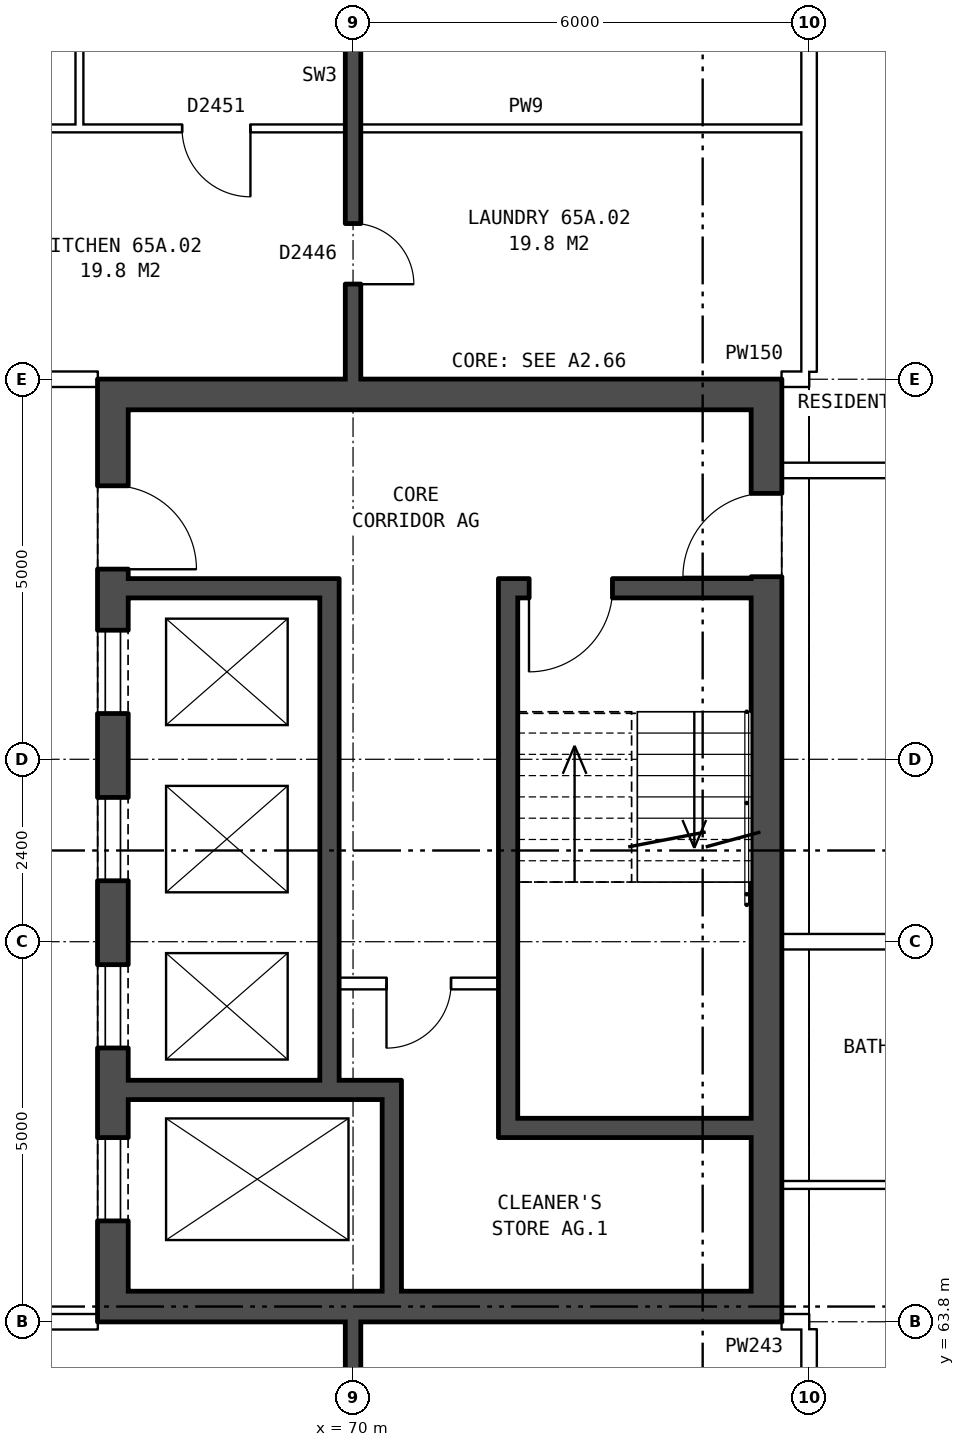
"""IFC4 building model, lengths in metres.
Left out: names, types, materials, properties, quantities, classifications, styles, units other than length and angle.
Written with IfcOpenShell. Run it as: python <this file> out.ifc"""

import sys

from ifc_helpers import new_model, si_unit, direction, frame, frame_2d, origin, place, context, subcontext, project, spatial, rectangle, extrude, element, fill, save


model = new_model("IFC4")
c1 = context("Model", 3, precision=1e-05, world=origin(), true_north=direction((0.0, 1.0)))
c2 = subcontext(c1, "Body", "Model", "MODEL_VIEW")
j1 = project(units=[si_unit("LENGTHUNIT", "METRE"), si_unit("PLANEANGLEUNIT", "RADIAN")], contexts=[c1])
p1 = place(None, origin())
s1 = spatial("IfcSite", under=j1, at=p1, CompositionType="ELEMENT")
p2 = place(p1, origin())
s2 = spatial("IfcBuilding", under=s1, at=p2, CompositionType="ELEMENT")
p3 = place(p2, frame((0.0, 0.0, 230.7)))
s3 = spatial("IfcBuildingStorey", under=s2, at=p3, CompositionType="ELEMENT", Elevation=230.7)
p4 = place(p3, frame((66.84, 63.8, 0.0), z_axis=(0.0, 0.0, 1.0), x_axis=(0.0, 1.0, 0.0)))
e1 = element("IfcWall", 1, at=p4, inside=s3, PredefinedType="SHEAR", context=c2, shape_type="SweptSolid", body=[
    extrude(rectangle(XDim=12.4, YDim=0.4, at=frame_2d((6.2, 0.0))), origin(), (0.0, 0.0, 1.0), 2.85),
])
p5 = place(p4, frame((1.325, 0.0, 0.0)))
e2 = element("IfcOpeningElement", 2, at=p5, cuts=e1, PredefinedType="OPENING", context=c2, shape_type="SweptSolid", body=[
    extrude(rectangle(XDim=1.1, YDim=2.1, at=frame_2d((0.55, 1.05))), frame((0.0, 0.21, 0.0), z_axis=(0.0, -1.0, 0.0), x_axis=(1.0, 0.0, 0.0)), (0.0, 0.0, 1.0), 0.42),
])
p6 = place(p4, frame((3.6, 0.0, 0.0)))
e3 = element("IfcOpeningElement", 3, at=p6, cuts=e1, PredefinedType="OPENING", context=c2, shape_type="SweptSolid", body=[
    extrude(rectangle(XDim=1.1, YDim=2.1, at=frame_2d((0.55, 1.05))), frame((0.0, 0.21, 0.0), z_axis=(0.0, -1.0, 0.0), x_axis=(1.0, 0.0, 0.0)), (0.0, 0.0, 1.0), 0.42),
])
p7 = place(p4, frame((5.8, 0.0, 0.0)))
e4 = element("IfcOpeningElement", 4, at=p7, cuts=e1, PredefinedType="OPENING", context=c2, shape_type="SweptSolid", body=[
    extrude(rectangle(XDim=1.1, YDim=2.1, at=frame_2d((0.55, 1.05))), frame((0.0, 0.21, 0.0), z_axis=(0.0, -1.0, 0.0), x_axis=(1.0, 0.0, 0.0)), (0.0, 0.0, 1.0), 0.42),
])
p8 = place(p4, frame((8.0, 0.0, 0.0)))
e5 = element("IfcOpeningElement", 5, at=p8, cuts=e1, PredefinedType="OPENING", context=c2, shape_type="SweptSolid", body=[
    extrude(rectangle(XDim=1.1, YDim=2.1, at=frame_2d((0.55, 1.05))), frame((0.0, 0.21, 0.0), z_axis=(0.0, -1.0, 0.0), x_axis=(1.0, 0.0, 0.0)), (0.0, 0.0, 1.0), 0.42),
])
p9 = place(p4, frame((9.9, 0.0, 0.0)))
e6 = element("IfcOpeningElement", 6, at=p9, cuts=e1, PredefinedType="OPENING", context=c2, shape_type="SweptSolid", body=[
    extrude(rectangle(XDim=1.1, YDim=2.1, at=frame_2d((0.55, 1.05))), frame((0.0, 0.21, 0.0), z_axis=(0.0, -1.0, 0.0), x_axis=(1.0, 0.0, 0.0)), (0.0, 0.0, 1.0), 0.42),
])
p10 = place(p3, frame((75.44, 63.8, 0.0), z_axis=(0.0, 0.0, 1.0), x_axis=(0.0, 1.0, 0.0)))
e7 = element("IfcWall", 7, at=p10, inside=s3, PredefinedType="SHEAR", context=c2, shape_type="SweptSolid", body=[
    extrude(rectangle(XDim=12.4, YDim=0.4, at=frame_2d((6.2, 0.0))), origin(), (0.0, 0.0, 1.0), 2.85),
])
p11 = place(p10, frame((9.8, 0.0, 0.0)))
e8 = element("IfcOpeningElement", 8, at=p11, cuts=e7, PredefinedType="OPENING", context=c2, shape_type="SweptSolid", body=[
    extrude(rectangle(XDim=1.1, YDim=2.1, at=frame_2d((0.55, 1.05))), frame((0.0, 0.21, 0.0), z_axis=(0.0, -1.0, 0.0), x_axis=(1.0, 0.0, 0.0)), (0.0, 0.0, 1.0), 0.42),
])
for number, where, z_axis, x_axis in (
    (9, (67.04, 64.0, 0.0), (0.0, 0.0, 1.0), (1.0, 0.0, 0.0)),
    (10, (67.04, 76.0, 0.0), (0.0, 0.0, 1.0), (1.0, 0.0, 0.0)),
):
    element("IfcWall", number, at=place(p3, frame(where, z_axis=z_axis, x_axis=x_axis)), inside=s3, PredefinedType="SHEAR", context=c2, shape_type="SweptSolid", body=[
        extrude(rectangle(XDim=8.2, YDim=0.4, at=frame_2d((4.1, 0.0))), origin(), (0.0, 0.0, 1.0), 2.85),
    ])
p12 = place(p3, frame((72.165, 66.35, 0.0), z_axis=(0.0, 0.0, 1.0), x_axis=(1.0, 0.0, 0.0)))
e11 = element("IfcWall", 11, at=p12, inside=s3, PredefinedType="SHEAR", context=c2, shape_type="SweptSolid", body=[
    extrude(rectangle(XDim=3.075, YDim=0.25, at=frame_2d((1.538, 0.0))), origin(), (0.0, 0.0, 1.0), 2.85),
])
p13 = place(p3, frame((67.04, 66.85, 0.0), z_axis=(0.0, 0.0, 1.0), x_axis=(1.0, 0.0, 0.0)))
e12 = element("IfcWall", 12, at=p13, inside=s3, PredefinedType="SHEAR", context=c2, shape_type="SweptSolid", body=[
    extrude(rectangle(XDim=3.595, YDim=0.25, at=frame_2d((1.797, 0.0))), origin(), (0.0, 0.0, 1.0), 2.85),
])
p14 = place(p3, frame((69.815, 68.25, 0.0), z_axis=(0.0, 0.0, 1.0), x_axis=(1.0, 0.0, 0.0)))
e13 = element("IfcWall", 13, at=p14, inside=s3, PredefinedType="PARTITIONING", context=c2, shape_type="SweptSolid", body=[
    extrude(rectangle(XDim=2.1, YDim=0.15, at=frame_2d((1.05, 0.0))), origin(), (0.0, 0.0, 1.0), 2.85),
])
p15 = place(p14, frame((0.625, 0.0, 0.0)))
e14 = element("IfcOpeningElement", 14, at=p15, cuts=e13, PredefinedType="OPENING", context=c2, shape_type="SweptSolid", body=[
    extrude(rectangle(XDim=0.85, YDim=2.1, at=frame_2d((0.425, 1.05))), frame((0.0, 0.085, 0.0), z_axis=(0.0, -1.0, 0.0), x_axis=(1.0, 0.0, 0.0)), (0.0, 0.0, 1.0), 0.17),
])
p16 = place(p3, frame((67.04, 73.45, 0.0), z_axis=(0.0, 0.0, 1.0), x_axis=(1.0, 0.0, 0.0)))
e15 = element("IfcWall", 15, at=p16, inside=s3, PredefinedType="SHEAR", context=c2, shape_type="SweptSolid", body=[
    extrude(rectangle(XDim=2.525, YDim=0.25, at=frame_2d((1.262, 0.0))), origin(), (0.0, 0.0, 1.0), 2.85),
])
p17 = place(p3, frame((72.165, 73.45, 0.0), z_axis=(0.0, 0.0, 1.0), x_axis=(1.0, 0.0, 0.0)))
e16 = element("IfcWall", 16, at=p17, inside=s3, PredefinedType="SHEAR", context=c2, shape_type="SweptSolid", body=[
    extrude(rectangle(XDim=3.075, YDim=0.25, at=frame_2d((1.538, 0.0))), origin(), (0.0, 0.0, 1.0), 2.85),
])
p18 = place(p17, frame((0.15, 0.0, 0.0)))
e17 = element("IfcOpeningElement", 17, at=p18, cuts=e16, PredefinedType="OPENING", context=c2, shape_type="SweptSolid", body=[
    extrude(rectangle(XDim=1.1, YDim=2.1, at=frame_2d((0.55, 1.05))), frame((0.0, 0.135, 0.0), z_axis=(0.0, -1.0, 0.0), x_axis=(1.0, 0.0, 0.0)), (0.0, 0.0, 1.0), 0.27),
])
p19 = place(p3, frame((69.69, 66.975, 0.0), z_axis=(0.0, 0.0, 1.0), x_axis=(0.0, 1.0, 0.0)))
e18 = element("IfcWall", 18, at=p19, inside=s3, PredefinedType="SHEAR", context=c2, shape_type="SweptSolid", body=[
    extrude(rectangle(XDim=6.6, YDim=0.25, at=frame_2d((3.3, 0.0))), origin(), (0.0, 0.0, 1.0), 2.85),
])
p20 = place(p3, frame((70.51, 64.2, 0.0), z_axis=(0.0, 0.0, 1.0), x_axis=(0.0, 1.0, 0.0)))
e19 = element("IfcWall", 19, at=p20, inside=s3, PredefinedType="SHEAR", context=c2, shape_type="SweptSolid", body=[
    extrude(rectangle(XDim=2.525, YDim=0.25, at=frame_2d((1.263, 0.0))), origin(), (0.0, 0.0, 1.0), 2.85),
])
p21 = place(p3, frame((72.04, 66.225, 0.0), z_axis=(0.0, 0.0, 1.0), x_axis=(0.0, 1.0, 0.0)))
e20 = element("IfcWall", 20, at=p21, inside=s3, PredefinedType="SHEAR", context=c2, shape_type="SweptSolid", body=[
    extrude(rectangle(XDim=7.35, YDim=0.25, at=frame_2d((3.675, 0.0))), origin(), (0.0, 0.0, 1.0), 2.85),
])
p22 = place(p3, frame((63.64, 63.8, 0.0), z_axis=(0.0, 0.0, 1.0), x_axis=(1.0, 0.0, 0.0)))
e21 = element("IfcWall", 21, at=p22, inside=s3, PredefinedType="PARTITIONING", context=c2, shape_type="SweptSolid", body=[
    extrude(rectangle(XDim=3.0, YDim=0.2, at=frame_2d((1.5, 0.0))), origin(), (0.0, 0.0, 1.0), 2.85),
])
p23 = place(p22, frame((1.18, 0.0, 0.0)))
e22 = element("IfcOpeningElement", 22, at=p23, cuts=e21, PredefinedType="OPENING", context=c2, shape_type="SweptSolid", body=[
    extrude(rectangle(XDim=1.0, YDim=2.1, at=frame_2d((0.5, 1.05))), frame((0.0, 0.11, 0.0), z_axis=(0.0, -1.0, 0.0), x_axis=(1.0, 0.0, 0.0)), (0.0, 0.0, 1.0), 0.22),
])
p24 = place(p3, frame((75.64, 63.8, 0.0), z_axis=(0.0, 0.0, 1.0), x_axis=(1.0, 0.0, 0.0)))
e23 = element("IfcWall", 23, at=p24, inside=s3, PredefinedType="PARTITIONING", context=c2, shape_type="SweptSolid", body=[
    extrude(rectangle(XDim=0.36, YDim=0.2, at=frame_2d((0.18, 0.0))), origin(), (0.0, 0.0, 1.0), 2.85),
])
p25 = place(p3, frame((75.64, 65.6, 0.0), z_axis=(0.0, 0.0, 1.0), x_axis=(1.0, 0.0, 0.0)))
e24 = element("IfcWall", 24, at=p25, inside=s3, PredefinedType="PARTITIONING", context=c2, shape_type="SweptSolid", body=[
    extrude(rectangle(XDim=3.798, YDim=0.1, at=frame_2d((1.899, 0.0))), origin(), (0.0, 0.0, 1.0), 2.85),
])
p26 = place(p3, frame((75.64, 68.8, 0.0), z_axis=(0.0, 0.0, 1.0), x_axis=(1.0, 0.0, 0.0)))
e25 = element("IfcWall", 25, at=p26, inside=s3, PredefinedType="PARTITIONING", context=c2, shape_type="SweptSolid", body=[
    extrude(rectangle(XDim=55.72, YDim=0.2, at=frame_2d((27.86, 0.0))), origin(), (0.0, 0.0, 1.0), 2.85),
])
p27 = place(p26, frame((5.191, 0.0, 0.0)))
e26 = element("IfcOpeningElement", 26, at=p27, cuts=e25, PredefinedType="OPENING", context=c2, shape_type="SweptSolid", body=[
    extrude(rectangle(XDim=1.0, YDim=2.1, at=frame_2d((0.5, 1.05))), frame((0.0, 0.11, 0.0), z_axis=(0.0, -1.0, 0.0), x_axis=(1.0, 0.0, 0.0)), (0.0, 0.0, 1.0), 0.22),
])
p28 = place(p26, frame((12.241, 0.0, 0.0)))
e27 = element("IfcOpeningElement", 27, at=p28, cuts=e25, PredefinedType="OPENING", context=c2, shape_type="SweptSolid", body=[
    extrude(rectangle(XDim=1.0, YDim=2.1, at=frame_2d((0.5, 1.05))), frame((0.0, 0.11, 0.0), z_axis=(0.0, -1.0, 0.0), x_axis=(1.0, 0.0, 0.0)), (0.0, 0.0, 1.0), 0.22),
])
p29 = place(p26, frame((22.553, 0.0, 0.0)))
e28 = element("IfcOpeningElement", 28, at=p29, cuts=e25, PredefinedType="OPENING", context=c2, shape_type="SweptSolid", body=[
    extrude(rectangle(XDim=1.0, YDim=2.1, at=frame_2d((0.5, 1.05))), frame((0.0, 0.11, 0.0), z_axis=(0.0, -1.0, 0.0), x_axis=(1.0, 0.0, 0.0)), (0.0, 0.0, 1.0), 0.22),
])
p30 = place(p26, frame((32.866, 0.0, 0.0)))
e29 = element("IfcOpeningElement", 29, at=p30, cuts=e25, PredefinedType="OPENING", context=c2, shape_type="SweptSolid", body=[
    extrude(rectangle(XDim=1.0, YDim=2.1, at=frame_2d((0.5, 1.05))), frame((0.0, 0.11, 0.0), z_axis=(0.0, -1.0, 0.0), x_axis=(1.0, 0.0, 0.0)), (0.0, 0.0, 1.0), 0.22),
])
p31 = place(p26, frame((36.303, 0.0, 0.0)))
e30 = element("IfcOpeningElement", 30, at=p31, cuts=e25, PredefinedType="OPENING", context=c2, shape_type="SweptSolid", body=[
    extrude(rectangle(XDim=1.0, YDim=2.1, at=frame_2d((0.5, 1.05))), frame((0.0, 0.11, 0.0), z_axis=(0.0, -1.0, 0.0), x_axis=(1.0, 0.0, 0.0)), (0.0, 0.0, 1.0), 0.22),
])
p32 = place(p26, frame((46.616, 0.0, 0.0)))
e31 = element("IfcOpeningElement", 31, at=p32, cuts=e25, PredefinedType="OPENING", context=c2, shape_type="SweptSolid", body=[
    extrude(rectangle(XDim=1.0, YDim=2.1, at=frame_2d((0.5, 1.05))), frame((0.0, 0.11, 0.0), z_axis=(0.0, -1.0, 0.0), x_axis=(1.0, 0.0, 0.0)), (0.0, 0.0, 1.0), 0.22),
])
p33 = place(p26, frame((53.496, 0.0, 0.0)))
e32 = element("IfcOpeningElement", 32, at=p33, cuts=e25, PredefinedType="OPENING", context=c2, shape_type="SweptSolid", body=[
    extrude(rectangle(XDim=1.0, YDim=2.1, at=frame_2d((0.5, 1.05))), frame((0.0, 0.11, 0.0), z_axis=(0.0, -1.0, 0.0), x_axis=(1.0, 0.0, 0.0)), (0.0, 0.0, 1.0), 0.22),
])
p34 = place(p3, frame((75.64, 75.0, 0.0), z_axis=(0.0, 0.0, 1.0), x_axis=(1.0, 0.0, 0.0)))
e33 = element("IfcWall", 33, at=p34, inside=s3, PredefinedType="PARTITIONING", context=c2, shape_type="SweptSolid", body=[
    extrude(rectangle(XDim=7.585, YDim=0.2, at=frame_2d((3.792, 0.0))), origin(), (0.0, 0.0, 1.0), 2.85),
])
p35 = place(p34, frame((3.343, 0.0, 0.0)))
e34 = element("IfcOpeningElement", 34, at=p35, cuts=e33, PredefinedType="OPENING", context=c2, shape_type="SweptSolid", body=[
    extrude(rectangle(XDim=0.9, YDim=2.1, at=frame_2d((0.45, 1.05))), frame((0.0, 0.11, 0.0), z_axis=(0.0, -1.0, 0.0), x_axis=(1.0, 0.0, 0.0)), (0.0, 0.0, 1.0), 0.22),
])
p36 = place(p3, frame((63.64, 76.2, 0.0), z_axis=(0.0, 0.0, 1.0), x_axis=(1.0, 0.0, 0.0)))
e35 = element("IfcWall", 35, at=p36, inside=s3, PredefinedType="PARTITIONING", context=c2, shape_type="SweptSolid", body=[
    extrude(rectangle(XDim=3.0, YDim=0.2, at=frame_2d((1.5, 0.0))), origin(), (0.0, 0.0, 1.0), 2.85),
])
p37 = place(p36, frame((1.18, 0.0, 0.0)))
e36 = element("IfcOpeningElement", 36, at=p37, cuts=e35, PredefinedType="OPENING", context=c2, shape_type="SweptSolid", body=[
    extrude(rectangle(XDim=1.0, YDim=2.1, at=frame_2d((0.5, 1.05))), frame((0.0, 0.11, 0.0), z_axis=(0.0, -1.0, 0.0), x_axis=(1.0, 0.0, 0.0)), (0.0, 0.0, 1.0), 0.22),
])
p38 = place(p3, frame((75.64, 76.2, 0.0), z_axis=(0.0, 0.0, 1.0), x_axis=(1.0, 0.0, 0.0)))
e37 = element("IfcWall", 37, at=p38, inside=s3, PredefinedType="PARTITIONING", context=c2, shape_type="SweptSolid", body=[
    extrude(rectangle(XDim=0.36, YDim=0.2, at=frame_2d((0.18, 0.0))), origin(), (0.0, 0.0, 1.0), 2.85),
])
p39 = place(p3, frame((64.1, 79.5, 0.0), z_axis=(0.0, 0.0, 1.0), x_axis=(1.0, 0.0, 0.0)))
e38 = element("IfcWall", 38, at=p39, inside=s3, PredefinedType="PARTITIONING", context=c2, shape_type="SweptSolid", body=[
    extrude(rectangle(XDim=11.8, YDim=0.1, at=frame_2d((5.9, 0.0))), origin(), (0.0, 0.0, 1.0), 2.85),
])
p40 = place(p39, frame((3.65, 0.0, 0.0)))
e39 = element("IfcOpeningElement", 39, at=p40, cuts=e38, PredefinedType="OPENING", context=c2, shape_type="SweptSolid", body=[
    extrude(rectangle(XDim=0.9, YDim=2.1, at=frame_2d((0.45, 1.05))), frame((0.0, 0.06, 0.0), z_axis=(0.0, -1.0, 0.0), x_axis=(1.0, 0.0, 0.0)), (0.0, 0.0, 1.0), 0.12),
])
p41 = place(p39, frame((0.7, 0.0, 0.0)))
e40 = element("IfcOpeningElement", 40, at=p41, cuts=e38, PredefinedType="OPENING", context=c2, shape_type="SweptSolid", body=[
    extrude(rectangle(XDim=0.9, YDim=2.1, at=frame_2d((0.45, 1.05))), frame((0.0, 0.06, 0.0), z_axis=(0.0, -1.0, 0.0), x_axis=(1.0, 0.0, 0.0)), (0.0, 0.0, 1.0), 0.12),
])
p42 = place(p3, frame((66.4, 79.55, 0.0), z_axis=(0.0, 0.0, 1.0), x_axis=(0.0, 1.0, 0.0)))
e41 = element("IfcWall", 41, at=p42, inside=s3, PredefinedType="PARTITIONING", context=c2, shape_type="SweptSolid", body=[
    extrude(rectangle(XDim=2.7, YDim=0.1, at=frame_2d((1.35, 0.0))), origin(), (0.0, 0.0, 1.0), 2.85),
])
p43 = place(p3, frame((70.0, 54.36, 0.0), z_axis=(0.0, 0.0, 1.0), x_axis=(0.0, 1.0, 0.0)))
e42 = element("IfcWall", 42, at=p43, inside=s3, PredefinedType="SOLIDWALL", context=c2, shape_type="SweptSolid", body=[
    extrude(rectangle(XDim=9.44, YDim=0.2, at=frame_2d((4.72, 0.0))), origin(), (0.0, 0.0, 1.0), 2.85),
])
p44 = place(p43, frame((2.32, 0.0, 0.0)))
e43 = element("IfcOpeningElement", 43, at=p44, cuts=e42, PredefinedType="OPENING", context=c2, shape_type="SweptSolid", body=[
    extrude(rectangle(XDim=0.9, YDim=2.1, at=frame_2d((0.45, 1.05))), frame((0.0, 0.11, 0.0), z_axis=(0.0, -1.0, 0.0), x_axis=(1.0, 0.0, 0.0)), (0.0, 0.0, 1.0), 0.22),
])
p45 = place(p43, frame((7.39, 0.0, 0.0)))
e44 = element("IfcOpeningElement", 44, at=p45, cuts=e42, PredefinedType="OPENING", context=c2, shape_type="SweptSolid", body=[
    extrude(rectangle(XDim=0.8, YDim=2.1, at=frame_2d((0.4, 1.05))), frame((0.0, 0.11, 0.0), z_axis=(0.0, -1.0, 0.0), x_axis=(1.0, 0.0, 0.0)), (0.0, 0.0, 1.0), 0.22),
])
p46 = place(p3, frame((70.0, 76.2, 0.0), z_axis=(0.0, 0.0, 1.0), x_axis=(0.0, 1.0, 0.0)))
e45 = element("IfcWall", 45, at=p46, inside=s3, PredefinedType="SOLIDWALL", context=c2, shape_type="SweptSolid", body=[
    extrude(rectangle(XDim=9.44, YDim=0.2, at=frame_2d((4.72, 0.0))), origin(), (0.0, 0.0, 1.0), 2.85),
])
p47 = place(p46, frame((5.92, 0.0, 0.0)))
e46 = element("IfcOpeningElement", 46, at=p47, cuts=e45, PredefinedType="OPENING", context=c2, shape_type="SweptSolid", body=[
    extrude(rectangle(XDim=0.9, YDim=2.1, at=frame_2d((0.45, 1.05))), frame((0.0, 0.11, 0.0), z_axis=(0.0, -1.0, 0.0), x_axis=(1.0, 0.0, 0.0)), (0.0, 0.0, 1.0), 0.22),
])
p48 = place(p46, frame((1.25, 0.0, 0.0)))
e47 = element("IfcOpeningElement", 47, at=p48, cuts=e45, PredefinedType="OPENING", context=c2, shape_type="SweptSolid", body=[
    extrude(rectangle(XDim=0.8, YDim=2.1, at=frame_2d((0.4, 1.05))), frame((0.0, 0.11, 0.0), z_axis=(0.0, -1.0, 0.0), x_axis=(1.0, 0.0, 0.0)), (0.0, 0.0, 1.0), 0.22),
])
for number, where, z_axis, x_axis in (
    (48, (76.0, 54.36, 0.0), (0.0, 0.0, 1.0), (0.0, 1.0, 0.0)),
    (49, (76.0, 76.3, 0.0), (0.0, 0.0, 1.0), (0.0, 1.0, 0.0)),
):
    element("IfcWall", number, at=place(p3, frame(where, z_axis=z_axis, x_axis=x_axis)), inside=s3, PredefinedType="PARTITIONING", context=c2, shape_type="SweptSolid", body=[
        extrude(rectangle(XDim=9.34, YDim=0.2, at=frame_2d((4.67, 0.0))), origin(), (0.0, 0.0, 1.0), 2.85),
    ])
p49 = place(p5, origin())
e50 = element("IfcDoor", 50, at=p49, inside=s3, OperationType="DOUBLE_DOOR_SLIDING", PredefinedType="DOOR", context=c2, shape_type="SweptSolid", body=[
    extrude(rectangle(XDim=1.1, YDim=2.1, at=frame_2d((0.55, 1.05))), frame((0.0, -0.135, 0.0), z_axis=(0.0, -1.0, 0.0), x_axis=(1.0, 0.0, 0.0)), (0.0, 0.0, 1.0), 0.05),
])
fill(e2, e50)
p50 = place(p6, origin())
e51 = element("IfcDoor", 51, at=p50, inside=s3, OperationType="DOUBLE_DOOR_SLIDING", PredefinedType="DOOR", context=c2, shape_type="SweptSolid", body=[
    extrude(rectangle(XDim=1.1, YDim=2.1, at=frame_2d((0.55, 1.05))), frame((0.0, -0.135, 0.0), z_axis=(0.0, -1.0, 0.0), x_axis=(1.0, 0.0, 0.0)), (0.0, 0.0, 1.0), 0.05),
])
fill(e3, e51)
p51 = place(p7, origin())
e52 = element("IfcDoor", 52, at=p51, inside=s3, OperationType="DOUBLE_DOOR_SLIDING", PredefinedType="DOOR", context=c2, shape_type="SweptSolid", body=[
    extrude(rectangle(XDim=1.1, YDim=2.1, at=frame_2d((0.55, 1.05))), frame((0.0, -0.135, 0.0), z_axis=(0.0, -1.0, 0.0), x_axis=(1.0, 0.0, 0.0)), (0.0, 0.0, 1.0), 0.05),
])
fill(e4, e52)
p52 = place(p8, origin())
e53 = element("IfcDoor", 53, at=p52, inside=s3, OperationType="DOUBLE_DOOR_SLIDING", PredefinedType="DOOR", context=c2, shape_type="SweptSolid", body=[
    extrude(rectangle(XDim=1.1, YDim=2.1, at=frame_2d((0.55, 1.05))), frame((0.0, -0.135, 0.0), z_axis=(0.0, -1.0, 0.0), x_axis=(1.0, 0.0, 0.0)), (0.0, 0.0, 1.0), 0.05),
])
fill(e5, e53)
p53 = place(p9, frame((1.1, 0.0, 0.0), z_axis=(0.0, 0.0, 1.0), x_axis=(-1.0, 0.0, 0.0)))
e54 = element("IfcDoor", 54, at=p53, inside=s3, OperationType="SINGLE_SWING_RIGHT", PredefinedType="DOOR", context=c2, shape_type="SweptSolid", body=[
    extrude(rectangle(XDim=1.1, YDim=2.1, at=frame_2d((0.55, 1.05))), frame((0.0, 0.185, 0.0), z_axis=(0.0, -1.0, 0.0), x_axis=(1.0, 0.0, 0.0)), (0.0, 0.0, 1.0), 0.05),
])
fill(e6, e54)
p54 = place(p18, frame((1.1, 0.0, 0.0), z_axis=(0.0, 0.0, 1.0), x_axis=(-1.0, 0.0, 0.0)))
e55 = element("IfcDoor", 55, at=p54, inside=s3, OperationType="SINGLE_SWING_RIGHT", PredefinedType="DOOR", context=c2, shape_type="SweptSolid", body=[
    extrude(rectangle(XDim=1.1, YDim=2.1, at=frame_2d((0.55, 1.05))), frame((0.0, 0.025, 0.0), z_axis=(0.0, -1.0, 0.0), x_axis=(1.0, 0.0, 0.0)), (0.0, 0.0, 1.0), 0.05),
])
fill(e17, e55)
p55 = place(p15, frame((0.85, 0.0, 0.0), z_axis=(0.0, 0.0, 1.0), x_axis=(-1.0, 0.0, 0.0)))
e56 = element("IfcDoor", 56, at=p55, inside=s3, OperationType="SINGLE_SWING_RIGHT", PredefinedType="DOOR", context=c2, shape_type="SweptSolid", body=[
    extrude(rectangle(XDim=0.85, YDim=2.1, at=frame_2d((0.425, 1.05))), frame((0.0, 0.025, 0.0), z_axis=(0.0, -1.0, 0.0), x_axis=(1.0, 0.0, 0.0)), (0.0, 0.0, 1.0), 0.05),
])
fill(e14, e56)
p56 = place(p11, origin())
e57 = element("IfcDoor", 57, at=p56, inside=s3, OperationType="SINGLE_SWING_LEFT", PredefinedType="DOOR", context=c2, shape_type="SweptSolid", body=[
    extrude(rectangle(XDim=1.1, YDim=2.1, at=frame_2d((0.55, 1.05))), frame((0.0, 0.185, 0.0), z_axis=(0.0, -1.0, 0.0), x_axis=(1.0, 0.0, 0.0)), (0.0, 0.0, 1.0), 0.05),
])
fill(e8, e57)
p57 = place(p40, frame((0.9, 0.0, 0.0), z_axis=(0.0, 0.0, 1.0), x_axis=(-1.0, 0.0, 0.0)))
e58 = element("IfcDoor", 58, at=p57, inside=s3, OperationType="SINGLE_SWING_LEFT", PredefinedType="DOOR", context=c2, shape_type="SweptSolid", body=[
    extrude(rectangle(XDim=0.9, YDim=2.1, at=frame_2d((0.45, 1.05))), frame((0.0, 0.025, 0.0), z_axis=(0.0, -1.0, 0.0), x_axis=(1.0, 0.0, 0.0)), (0.0, 0.0, 1.0), 0.05),
])
fill(e39, e58)
p58 = place(p48, frame((0.8, 0.0, 0.0), z_axis=(0.0, 0.0, 1.0), x_axis=(-1.0, 0.0, 0.0)))
e59 = element("IfcDoor", 59, at=p58, inside=s3, OperationType="SINGLE_SWING_RIGHT", PredefinedType="DOOR", context=c2, shape_type="SweptSolid", body=[
    extrude(rectangle(XDim=0.8, YDim=2.1, at=frame_2d((0.4, 1.05))), frame((0.0, 0.025, 0.0), z_axis=(0.0, -1.0, 0.0), x_axis=(1.0, 0.0, 0.0)), (0.0, 0.0, 1.0), 0.05),
])
fill(e47, e59)
save(model, sys.argv[1])
